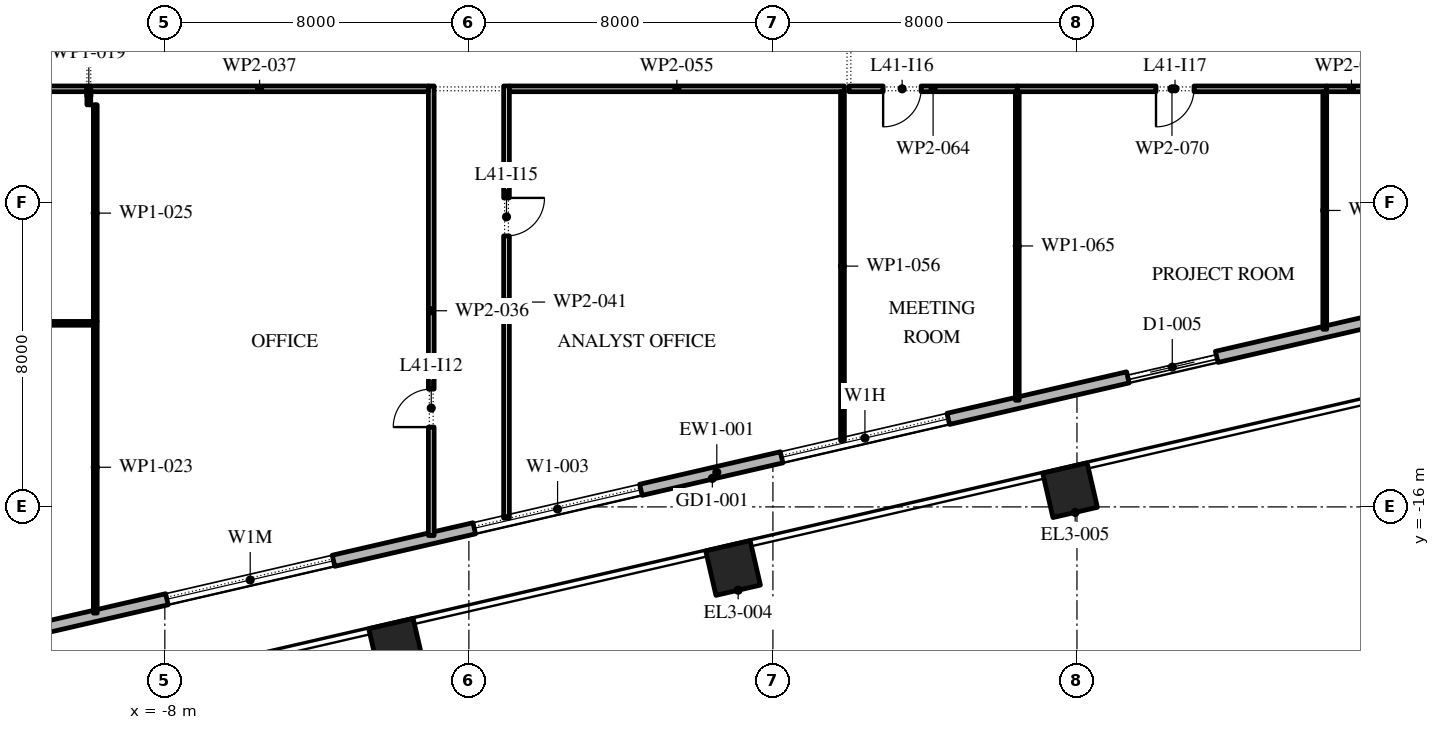
"""IFC4 building model, lengths in metres.
Left out: names, types, materials, properties, quantities, classifications, styles, units other than length and angle.
Written with IfcOpenShell. Run it as: python <this file> out.ifc"""

import sys

from ifc_helpers import new_model, si_unit, direction, frame, frame_2d, origin, origin_2d, place, context, subcontext, project, spatial, rectangle, extrude, element, fill, save


model = new_model("IFC4")
c1 = context("Model", 3, precision=1e-05, world=origin(), true_north=direction((0.0, 1.0)))
c2 = subcontext(c1, "Body", "Model", "MODEL_VIEW")
j1 = project(units=[si_unit("LENGTHUNIT", "METRE"), si_unit("PLANEANGLEUNIT", "RADIAN")], contexts=[c1])
p1 = place(None, origin())
s1 = spatial("IfcSite", under=j1, at=p1, CompositionType="ELEMENT")
p2 = place(p1, origin())
s2 = spatial("IfcBuilding", under=s1, at=p2, CompositionType="ELEMENT")
p3 = place(p2, frame((0.0, 0.0, 188.4)))
s3 = spatial("IfcBuildingStorey", under=s2, at=p3, CompositionType="ELEMENT", Elevation=188.4)
for number, where, z_axis, x_axis in (
    (1, (-1.916, -19.655, 0.0), (0.0, 0.0, 1.0), (0.974, 0.225, 0.0)),
    (2, (6.951, -17.608, 0.0), (0.0, 0.0, 1.0), (0.974, 0.225, 0.0)),
    (3, (15.818, -15.561, 0.0), (0.0, 0.0, 1.0), (0.974, 0.225, 0.0)),
):
    element("IfcColumn", number, at=place(p3, frame(where, z_axis=z_axis, x_axis=x_axis)), inside=s3, PredefinedType="COLUMN", context=c2, shape_type="SweptSolid", body=[
        extrude(rectangle(XDim=1.2, YDim=1.2, at=origin_2d()), origin(), (0.0, 0.0, 1.0), 4.2),
    ])
p4 = place(p3, frame((-17.592, -20.657, 0.0), z_axis=(0.0, 0.0, 1.0), x_axis=(0.974370243697, 0.224950279389, 0.0)))
e4 = element("IfcWall", 4, at=p4, inside=s3, PredefinedType="STANDARD", context=c2, shape_type="SweptSolid", body=[
    extrude(rectangle(XDim=49.5, YDim=0.3, at=frame_2d((24.75, 0.0))), origin(), (0.0, 0.0, 1.0), 4.0),
])
p5 = place(p4, frame((2.8, 0.0, 0.0)))
e5 = element("IfcOpeningElement", 5, at=p5, cuts=e4, PredefinedType="OPENING", context=c2, shape_type="SweptSolid", body=[
    extrude(rectangle(XDim=2.4, YDim=3.5, at=frame_2d((1.2, 1.75))), frame((0.0, 0.16, 0.0), z_axis=(0.0, -1.0, 0.0), x_axis=(1.0, 0.0, 0.0)), (0.0, 0.0, 1.0), 0.32),
])
p6 = place(p4, frame((9.9, 0.0, 0.45)))
e6 = element("IfcOpeningElement", 6, at=p6, cuts=e4, PredefinedType="OPENING", context=c2, shape_type="SweptSolid", body=[
    extrude(rectangle(XDim=4.5, YDim=2.575, at=frame_2d((2.25, 1.288))), frame((0.0, 0.16, 0.0), z_axis=(0.0, -1.0, 0.0), x_axis=(1.0, 0.0, 0.0)), (0.0, 0.0, 1.0), 0.32),
])
p7 = place(p4, frame((18.2, 0.0, 0.45)))
e7 = element("IfcOpeningElement", 7, at=p7, cuts=e4, PredefinedType="OPENING", context=c2, shape_type="SweptSolid", body=[
    extrude(rectangle(XDim=4.5, YDim=3.05, at=frame_2d((2.25, 1.525))), frame((0.0, 0.16, 0.0), z_axis=(0.0, -1.0, 0.0), x_axis=(1.0, 0.0, 0.0)), (0.0, 0.0, 1.0), 0.32),
])
p8 = place(p4, frame((26.5, 0.0, 0.45)))
e8 = element("IfcOpeningElement", 8, at=p8, cuts=e4, PredefinedType="OPENING", context=c2, shape_type="SweptSolid", body=[
    extrude(rectangle(XDim=4.5, YDim=2.75, at=frame_2d((2.25, 1.375))), frame((0.0, 0.16, 0.0), z_axis=(0.0, -1.0, 0.0), x_axis=(1.0, 0.0, 0.0)), (0.0, 0.0, 1.0), 0.32),
])
p9 = place(p4, frame((35.85, 0.0, 0.0)))
e9 = element("IfcOpeningElement", 9, at=p9, cuts=e4, PredefinedType="OPENING", context=c2, shape_type="SweptSolid", body=[
    extrude(rectangle(XDim=2.4, YDim=3.5, at=frame_2d((1.2, 1.75))), frame((0.0, 0.16, 0.0), z_axis=(0.0, -1.0, 0.0), x_axis=(1.0, 0.0, 0.0)), (0.0, 0.0, 1.0), 0.32),
])
p10 = place(p4, frame((43.1, 0.0, 0.45)))
e10 = element("IfcOpeningElement", 10, at=p10, cuts=e4, PredefinedType="OPENING", context=c2, shape_type="SweptSolid", body=[
    extrude(rectangle(XDim=4.5, YDim=2.875, at=frame_2d((2.25, 1.438))), frame((0.0, 0.16, 0.0), z_axis=(0.0, -1.0, 0.0), x_axis=(1.0, 0.0, 0.0)), (0.0, 0.0, 1.0), 0.32),
])
p11 = place(p3, frame((33.157, -5.092, 0.0), z_axis=(0.0, 0.0, 1.0), x_axis=(-0.224950279389, 0.974370243697, 0.0)))
e11 = element("IfcWall", 11, at=p11, inside=s3, PredefinedType="STANDARD", context=c2, shape_type="SweptSolid", body=[
    extrude(rectangle(XDim=49.5, YDim=0.3, at=frame_2d((24.75, 0.0))), origin(), (0.0, 0.0, 1.0), 4.0),
])
p12 = place(p11, frame((2.207, 0.0, 0.0)))
e12 = element("IfcOpeningElement", 12, at=p12, cuts=e11, PredefinedType="OPENING", context=c2, shape_type="SweptSolid", body=[
    extrude(rectangle(XDim=2.4, YDim=3.125, at=frame_2d((1.2, 1.562))), frame((0.0, 0.16, 0.0), z_axis=(0.0, -1.0, 0.0), x_axis=(1.0, 0.0, 0.0)), (0.0, 0.0, 1.0), 0.32),
])
p13 = place(p11, frame((8.121, 0.0, 0.45)))
e13 = element("IfcOpeningElement", 13, at=p13, cuts=e11, PredefinedType="OPENING", context=c2, shape_type="SweptSolid", body=[
    extrude(rectangle(XDim=4.5, YDim=2.875, at=frame_2d((2.25, 1.438))), frame((0.0, 0.16, 0.0), z_axis=(0.0, -1.0, 0.0), x_axis=(1.0, 0.0, 0.0)), (0.0, 0.0, 1.0), 0.32),
])
p14 = place(p11, frame((15.236, 0.0, 0.45)))
e14 = element("IfcOpeningElement", 14, at=p14, cuts=e11, PredefinedType="OPENING", context=c2, shape_type="SweptSolid", body=[
    extrude(rectangle(XDim=4.5, YDim=2.875, at=frame_2d((2.25, 1.438))), frame((0.0, 0.16, 0.0), z_axis=(0.0, -1.0, 0.0), x_axis=(1.0, 0.0, 0.0)), (0.0, 0.0, 1.0), 0.32),
])
p15 = place(p11, frame((22.35, 0.0, 0.45)))
e15 = element("IfcOpeningElement", 15, at=p15, cuts=e11, PredefinedType="OPENING", context=c2, shape_type="SweptSolid", body=[
    extrude(rectangle(XDim=4.5, YDim=3.0, at=frame_2d((2.25, 1.5))), frame((0.0, 0.16, 0.0), z_axis=(0.0, -1.0, 0.0), x_axis=(1.0, 0.0, 0.0)), (0.0, 0.0, 1.0), 0.32),
])
p16 = place(p11, frame((30.514, 0.0, 0.0)))
e16 = element("IfcOpeningElement", 16, at=p16, cuts=e11, PredefinedType="OPENING", context=c2, shape_type="SweptSolid", body=[
    extrude(rectangle(XDim=2.4, YDim=3.45, at=frame_2d((1.2, 1.725))), frame((0.0, 0.16, 0.0), z_axis=(0.0, -1.0, 0.0), x_axis=(1.0, 0.0, 0.0)), (0.0, 0.0, 1.0), 0.32),
])
p17 = place(p11, frame((36.579, 0.0, 0.45)))
e17 = element("IfcOpeningElement", 17, at=p17, cuts=e11, PredefinedType="OPENING", context=c2, shape_type="SweptSolid", body=[
    extrude(rectangle(XDim=4.5, YDim=3.05, at=frame_2d((2.25, 1.525))), frame((0.0, 0.16, 0.0), z_axis=(0.0, -1.0, 0.0), x_axis=(1.0, 0.0, 0.0)), (0.0, 0.0, 1.0), 0.32),
])
p18 = place(p11, frame((43.693, 0.0, 0.45)))
e18 = element("IfcOpeningElement", 18, at=p18, cuts=e11, PredefinedType="OPENING", context=c2, shape_type="SweptSolid", body=[
    extrude(rectangle(XDim=4.5, YDim=3.05, at=frame_2d((2.25, 1.525))), frame((0.0, 0.16, 0.0), z_axis=(0.0, -1.0, 0.0), x_axis=(1.0, 0.0, 0.0)), (0.0, 0.0, 1.0), 0.32),
])
p19 = place(p3, frame((-10.0, -5.42, 0.0), z_axis=(0.0, 0.0, 1.0), x_axis=(0.0, 1.0, 0.0)))
e19 = element("IfcWall", 19, at=p19, inside=s3, PredefinedType="PARTITIONING", context=c2, shape_type="SweptSolid", body=[
    extrude(rectangle(XDim=0.495, YDim=0.1, at=frame_2d((0.248, 0.0))), origin(), (0.0, 0.0, 1.0), 4.0),
])
p20 = place(p3, frame((-10.05, -5.0, 0.0), z_axis=(0.0, 0.0, 1.0), x_axis=(-1.0, 0.0, 0.0)))
e20 = element("IfcWall", 20, at=p20, inside=s3, PredefinedType="PARTITIONING", context=c2, shape_type="SweptSolid", body=[
    extrude(rectangle(XDim=13.665, YDim=0.15, at=frame_2d((6.833, 0.0))), origin(), (0.0, 0.0, 1.0), 4.0),
])
p21 = place(p20, frame((5.09, 0.0, 0.0)))
e21 = element("IfcOpeningElement", 21, at=p21, cuts=e20, PredefinedType="OPENING", context=c2, shape_type="SweptSolid", body=[
    extrude(rectangle(XDim=1.0, YDim=2.1, at=frame_2d((0.5, 1.05))), frame((0.0, 0.085, 0.0), z_axis=(0.0, -1.0, 0.0), x_axis=(1.0, 0.0, 0.0)), (0.0, 0.0, 1.0), 0.17),
])
p22 = place(p3, frame((-9.83, -18.794, 0.0), z_axis=(0.0, 0.0, 1.0), x_axis=(0.0, 1.0, 0.0)))
e22 = element("IfcWall", 22, at=p22, inside=s3, PredefinedType="PARTITIONING", context=c2, shape_type="SweptSolid", body=[
    extrude(rectangle(XDim=7.674, YDim=0.1, at=frame_2d((3.837, 0.0))), origin(), (0.0, 0.0, 1.0), 4.0),
])
p23 = place(p3, frame((-9.88, -11.17, 0.0), z_axis=(0.0, 0.0, 1.0), x_axis=(-1.0, 0.0, 0.0)))
e23 = element("IfcWall", 23, at=p23, inside=s3, PredefinedType="PARTITIONING", context=c2, shape_type="SweptSolid", body=[
    extrude(rectangle(XDim=13.68, YDim=0.1, at=frame_2d((6.84, 0.0))), origin(), (0.0, 0.0, 1.0), 4.0),
])
p24 = place(p23, frame((3.81, 0.0, 0.0)))
e24 = element("IfcOpeningElement", 24, at=p24, cuts=e23, PredefinedType="OPENING", context=c2, shape_type="SweptSolid", body=[
    extrude(rectangle(XDim=0.9, YDim=2.1, at=frame_2d((0.45, 1.05))), frame((0.0, 0.06, 0.0), z_axis=(0.0, -1.0, 0.0), x_axis=(1.0, 0.0, 0.0)), (0.0, 0.0, 1.0), 0.12),
])
p25 = place(p3, frame((-9.83, -11.12, 0.0), z_axis=(0.0, 0.0, 1.0), x_axis=(0.0, 1.0, 0.0)))
e25 = element("IfcWall", 25, at=p25, inside=s3, PredefinedType="PARTITIONING", context=c2, shape_type="SweptSolid", body=[
    extrude(rectangle(XDim=5.7, YDim=0.1, at=frame_2d((2.85, 0.0))), origin(), (0.0, 0.0, 1.0), 4.0),
])
p26 = place(p3, frame((-0.99, -16.753, 0.0), z_axis=(0.0, 0.0, 1.0), x_axis=(0.0, 1.0, 0.0)))
e26 = element("IfcWall", 26, at=p26, inside=s3, PredefinedType="PARTITIONING", context=c2, shape_type="SweptSolid", body=[
    extrude(rectangle(XDim=11.828, YDim=0.15, at=frame_2d((5.914, 0.0))), origin(), (0.0, 0.0, 1.0), 4.0),
])
p27 = place(p26, frame((2.853, 0.0, 0.0)))
e27 = element("IfcOpeningElement", 27, at=p27, cuts=e26, PredefinedType="OPENING", context=c2, shape_type="SweptSolid", body=[
    extrude(rectangle(XDim=1.0, YDim=2.1, at=frame_2d((0.5, 1.05))), frame((0.0, 0.085, 0.0), z_axis=(0.0, -1.0, 0.0), x_axis=(1.0, 0.0, 0.0)), (0.0, 0.0, 1.0), 0.17),
])
p28 = place(p3, frame((-1.065, -5.0, 0.0), z_axis=(0.0, 0.0, 1.0), x_axis=(-1.0, 0.0, 0.0)))
e28 = element("IfcWall", 28, at=p28, inside=s3, PredefinedType="PARTITIONING", context=c2, shape_type="SweptSolid", body=[
    extrude(rectangle(XDim=8.885, YDim=0.15, at=frame_2d((4.442, 0.0))), origin(), (0.0, 0.0, 1.0), 4.0),
])
p29 = place(p3, frame((0.99, -4.925, 0.0), z_axis=(0.0, 0.0, 1.0), x_axis=(0.0, -1.0, 0.0)))
e29 = element("IfcWall", 29, at=p29, inside=s3, PredefinedType="PARTITIONING", context=c2, shape_type="SweptSolid", body=[
    extrude(rectangle(XDim=11.371, YDim=0.15, at=frame_2d((5.686, 0.0))), origin(), (0.0, 0.0, 1.0), 4.0),
])
p30 = place(p29, frame((2.945, 0.0, 0.0)))
e30 = element("IfcOpeningElement", 30, at=p30, cuts=e29, PredefinedType="OPENING", context=c2, shape_type="SweptSolid", body=[
    extrude(rectangle(XDim=1.0, YDim=2.1, at=frame_2d((0.5, 1.05))), frame((0.0, 0.085, 0.0), z_axis=(0.0, -1.0, 0.0), x_axis=(1.0, 0.0, 0.0)), (0.0, 0.0, 1.0), 0.17),
])
p31 = place(p3, frame((9.88, -5.0, 0.0), z_axis=(0.0, 0.0, 1.0), x_axis=(-1.0, 0.0, 0.0)))
e31 = element("IfcWall", 31, at=p31, inside=s3, PredefinedType="PARTITIONING", context=c2, shape_type="SweptSolid", body=[
    extrude(rectangle(XDim=8.815, YDim=0.15, at=frame_2d((4.407, 0.0))), origin(), (0.0, 0.0, 1.0), 4.0),
])
p32 = place(p3, frame((9.83, -5.075, 0.0), z_axis=(0.0, 0.0, 1.0), x_axis=(0.0, -1.0, 0.0)))
e32 = element("IfcWall", 32, at=p32, inside=s3, PredefinedType="PARTITIONING", context=c2, shape_type="SweptSolid", body=[
    extrude(rectangle(XDim=9.18, YDim=0.1, at=frame_2d((4.59, 0.0))), origin(), (0.0, 0.0, 1.0), 4.0),
])
p33 = place(p3, frame((14.43, -5.0, 0.0), z_axis=(0.0, 0.0, 1.0), x_axis=(-1.0, 0.0, 0.0)))
e33 = element("IfcWall", 33, at=p33, inside=s3, PredefinedType="PARTITIONING", context=c2, shape_type="SweptSolid", body=[
    extrude(rectangle(XDim=4.43, YDim=0.15, at=frame_2d((2.215, 0.0))), origin(), (0.0, 0.0, 1.0), 4.0),
])
p34 = place(p33, frame((2.53, 0.0, 0.0)))
e34 = element("IfcOpeningElement", 34, at=p34, cuts=e33, PredefinedType="OPENING", context=c2, shape_type="SweptSolid", body=[
    extrude(rectangle(XDim=1.0, YDim=2.1, at=frame_2d((0.5, 1.05))), frame((0.0, 0.085, 0.0), z_axis=(0.0, -1.0, 0.0), x_axis=(1.0, 0.0, 0.0)), (0.0, 0.0, 1.0), 0.17),
])
p35 = place(p3, frame((14.43, -5.075, 0.0), z_axis=(0.0, 0.0, 1.0), x_axis=(0.0, -1.0, 0.0)))
e35 = element("IfcWall", 35, at=p35, inside=s3, PredefinedType="PARTITIONING", context=c2, shape_type="SweptSolid", body=[
    extrude(rectangle(XDim=8.118, YDim=0.1, at=frame_2d((4.059, 0.0))), origin(), (0.0, 0.0, 1.0), 4.0),
])
p36 = place(p3, frame((22.57, -5.0, 0.0), z_axis=(0.0, 0.0, 1.0), x_axis=(-1.0, 0.0, 0.0)))
e36 = element("IfcWall", 36, at=p36, inside=s3, PredefinedType="PARTITIONING", context=c2, shape_type="SweptSolid", body=[
    extrude(rectangle(XDim=8.14, YDim=0.15, at=frame_2d((4.07, 0.0))), origin(), (0.0, 0.0, 1.0), 4.0),
])
p37 = place(p36, frame((3.49, 0.0, 0.0)))
e37 = element("IfcOpeningElement", 37, at=p37, cuts=e36, PredefinedType="OPENING", context=c2, shape_type="SweptSolid", body=[
    extrude(rectangle(XDim=1.0, YDim=2.1, at=frame_2d((0.5, 1.05))), frame((0.0, 0.085, 0.0), z_axis=(0.0, -1.0, 0.0), x_axis=(1.0, 0.0, 0.0)), (0.0, 0.0, 1.0), 0.17),
])
p38 = place(p3, frame((22.52, -5.075, 0.0), z_axis=(0.0, 0.0, 1.0), x_axis=(0.0, -1.0, 0.0)))
e38 = element("IfcWall", 38, at=p38, inside=s3, PredefinedType="PARTITIONING", context=c2, shape_type="SweptSolid", body=[
    extrude(rectangle(XDim=6.25, YDim=0.1, at=frame_2d((3.125, 0.0))), origin(), (0.0, 0.0, 1.0), 4.0),
])
p39 = place(p3, frame((23.875, -5.0, 0.0), z_axis=(0.0, 0.0, 1.0), x_axis=(-1.0, 0.0, 0.0)))
e39 = element("IfcWall", 39, at=p39, inside=s3, PredefinedType="PARTITIONING", context=c2, shape_type="SweptSolid", body=[
    extrude(rectangle(XDim=1.305, YDim=0.15, at=frame_2d((0.652, 0.0))), origin(), (0.0, 0.0, 1.0), 4.0),
])
p40 = place(p6, origin())
e40 = element("IfcWindow", 40, at=p40, inside=s3, PartitioningType="DOUBLE_PANEL_VERTICAL", PredefinedType="WINDOW", context=c2, shape_type="SweptSolid", body=[
    extrude(rectangle(XDim=4.5, YDim=2.575, at=frame_2d((2.25, 1.288))), frame((0.0, 0.03, 0.0), z_axis=(0.0, -1.0, 0.0), x_axis=(1.0, 0.0, 0.0)), (0.0, 0.0, 1.0), 0.06),
])
fill(e6, e40)
p41 = place(p7, origin())
e41 = element("IfcWindow", 41, at=p41, inside=s3, PartitioningType="DOUBLE_PANEL_VERTICAL", PredefinedType="WINDOW", context=c2, shape_type="SweptSolid", body=[
    extrude(rectangle(XDim=4.5, YDim=3.05, at=frame_2d((2.25, 1.525))), frame((0.0, 0.03, 0.0), z_axis=(0.0, -1.0, 0.0), x_axis=(1.0, 0.0, 0.0)), (0.0, 0.0, 1.0), 0.06),
])
fill(e7, e41)
p42 = place(p8, origin())
e42 = element("IfcWindow", 42, at=p42, inside=s3, PartitioningType="DOUBLE_PANEL_VERTICAL", PredefinedType="WINDOW", context=c2, shape_type="SweptSolid", body=[
    extrude(rectangle(XDim=4.5, YDim=2.75, at=frame_2d((2.25, 1.375))), frame((0.0, 0.03, 0.0), z_axis=(0.0, -1.0, 0.0), x_axis=(1.0, 0.0, 0.0)), (0.0, 0.0, 1.0), 0.06),
])
fill(e8, e42)
p43 = place(p9, origin())
e43 = element("IfcDoor", 43, at=p43, inside=s3, OperationType="DOUBLE_DOOR_SLIDING", PredefinedType="DOOR", context=c2, shape_type="SweptSolid", body=[
    extrude(rectangle(XDim=2.4, YDim=3.5, at=frame_2d((1.2, 1.75))), frame((0.0, 0.025, 0.0), z_axis=(0.0, -1.0, 0.0), x_axis=(1.0, 0.0, 0.0)), (0.0, 0.0, 1.0), 0.05),
])
fill(e9, e43)
p44 = place(p27, origin())
e44 = element("IfcDoor", 44, at=p44, inside=s3, OperationType="SINGLE_SWING_RIGHT", PredefinedType="DOOR", context=c2, shape_type="SweptSolid", body=[
    extrude(rectangle(XDim=1.0, YDim=2.1, at=frame_2d((0.5, 1.05))), frame((0.0, 0.025, 0.0), z_axis=(0.0, -1.0, 0.0), x_axis=(1.0, 0.0, 0.0)), (0.0, 0.0, 1.0), 0.05),
])
fill(e27, e44)
p45 = place(p30, origin())
e45 = element("IfcDoor", 45, at=p45, inside=s3, OperationType="SINGLE_SWING_RIGHT", PredefinedType="DOOR", context=c2, shape_type="SweptSolid", body=[
    extrude(rectangle(XDim=1.0, YDim=2.1, at=frame_2d((0.5, 1.05))), frame((0.0, 0.025, 0.0), z_axis=(0.0, -1.0, 0.0), x_axis=(1.0, 0.0, 0.0)), (0.0, 0.0, 1.0), 0.05),
])
fill(e30, e45)
p46 = place(p34, origin())
e46 = element("IfcDoor", 46, at=p46, inside=s3, OperationType="SINGLE_SWING_LEFT", PredefinedType="DOOR", context=c2, shape_type="SweptSolid", body=[
    extrude(rectangle(XDim=1.0, YDim=2.1, at=frame_2d((0.5, 1.05))), frame((0.0, 0.025, 0.0), z_axis=(0.0, -1.0, 0.0), x_axis=(1.0, 0.0, 0.0)), (0.0, 0.0, 1.0), 0.05),
])
fill(e34, e46)
p47 = place(p37, origin())
e47 = element("IfcDoor", 47, at=p47, inside=s3, OperationType="SINGLE_SWING_LEFT", PredefinedType="DOOR", context=c2, shape_type="SweptSolid", body=[
    extrude(rectangle(XDim=1.0, YDim=2.1, at=frame_2d((0.5, 1.05))), frame((0.0, 0.025, 0.0), z_axis=(0.0, -1.0, 0.0), x_axis=(1.0, 0.0, 0.0)), (0.0, 0.0, 1.0), 0.05),
])
fill(e37, e47)
save(model, sys.argv[1])
